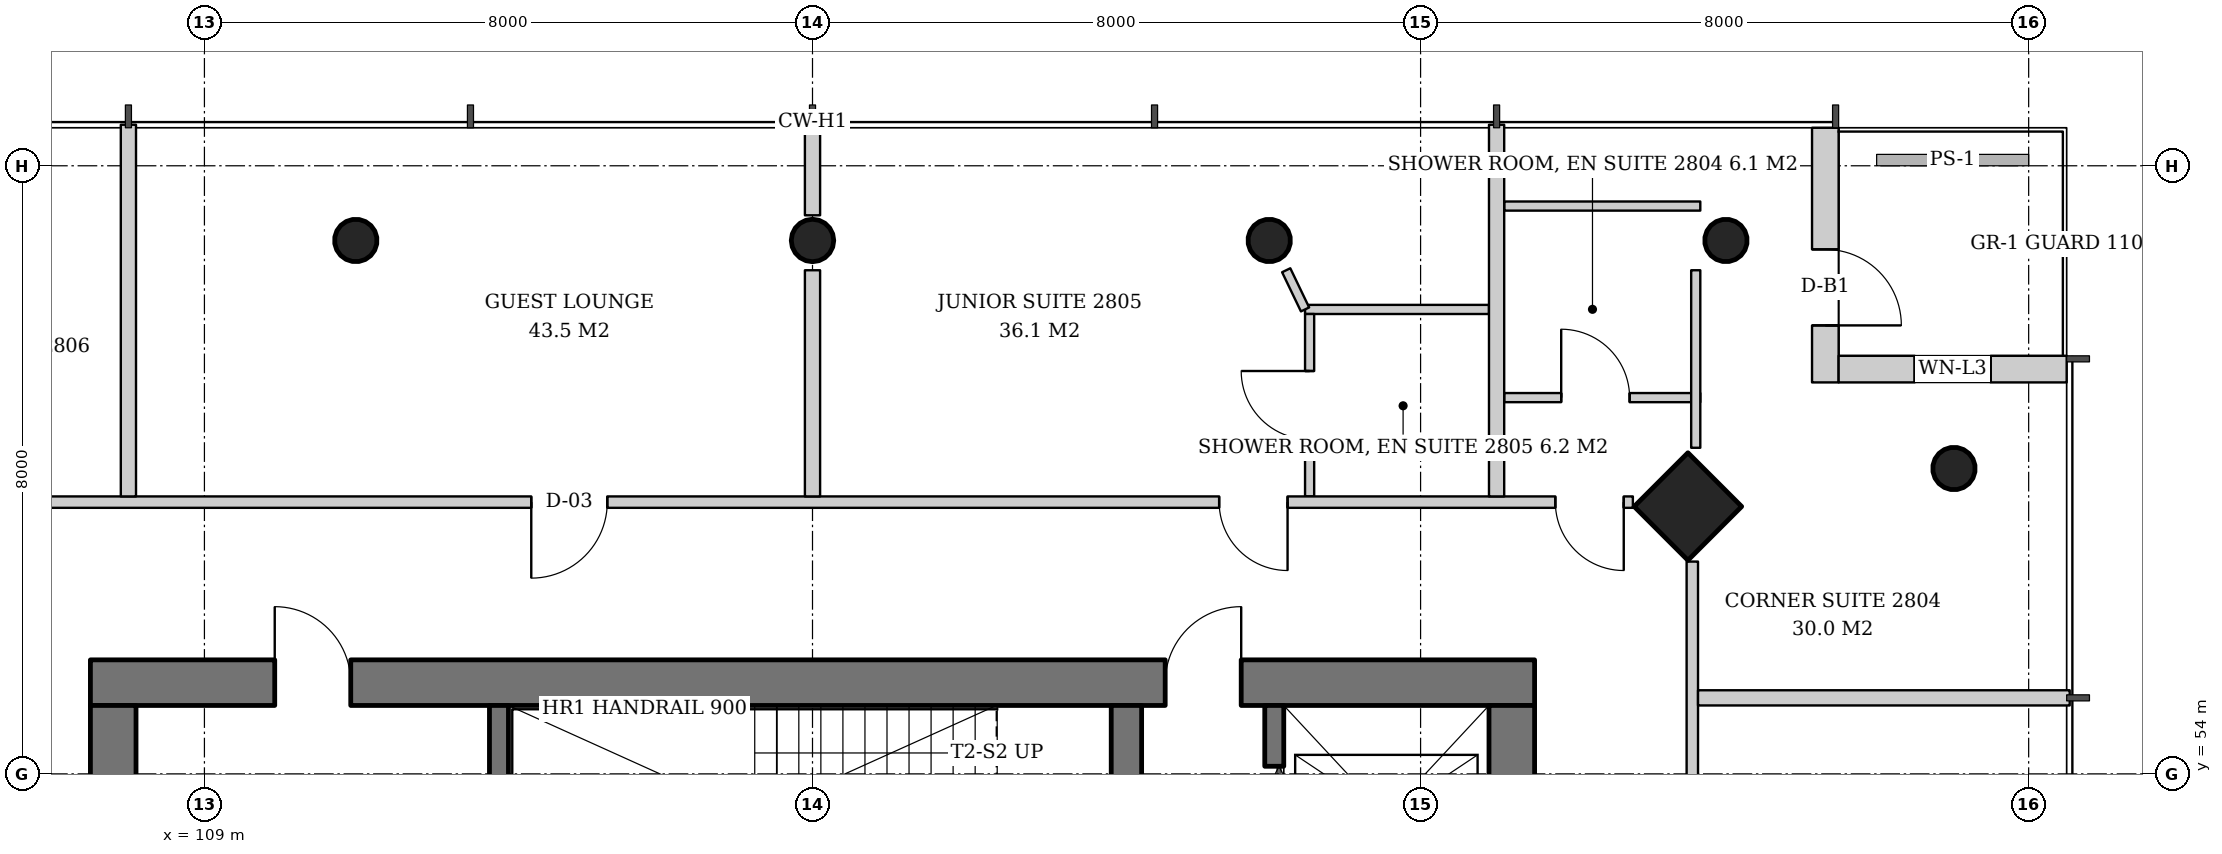
"""IFC4 building model, lengths in metres.
Left out: names, types, materials, properties, quantities, classifications, styles, units other than length and angle.
Written with IfcOpenShell. Run it as: python <this file> out.ifc"""

import sys

from ifc_helpers import new_model, si_unit, direction, frame, frame_2d, origin, origin_2d, place, context, subcontext, project, spatial, rectangle, hollow_circle, extrude, element, fill, save


model = new_model("IFC4")
c1 = context("Model", 3, precision=1e-05, world=origin(), true_north=direction((0.0, 1.0)))
c2 = subcontext(c1, "Body", "Model", "MODEL_VIEW")
j1 = project(units=[si_unit("LENGTHUNIT", "METRE"), si_unit("PLANEANGLEUNIT", "RADIAN")], contexts=[c1])
p1 = place(None, origin())
s1 = spatial("IfcSite", under=j1, at=p1, CompositionType="ELEMENT")
p2 = place(p1, origin())
s2 = spatial("IfcBuilding", under=s1, at=p2, CompositionType="ELEMENT")
p3 = place(p2, frame((0.0, 0.0, 112.2)))
s3 = spatial("IfcBuildingStorey", under=s2, at=p3, CompositionType="ELEMENT", Elevation=112.2)
p4 = place(p3, frame((128.569, 57.569, 0.0), z_axis=(-0.042965756413, -0.042965756413, 0.998152236661), x_axis=(0.707106781187, -0.707106781187, 0.0)))
e1 = element("IfcColumn", 1, at=p4, inside=s3, PredefinedType="COLUMN", context=c2, shape_type="SweptSolid", body=[
    extrude(rectangle(XDim=1.0, YDim=1.0, at=origin_2d()), origin(), (0.0, 0.0, 1.0), 3.807),
])
for number, where, z_axis, x_axis in (
    (2, (132.069, 58.069, 0.0), (-0.043, -0.043, 0.998), (0.707, -0.707, 0.0)),
    (3, (129.069, 61.069, 0.0), (-0.043, -0.043, 0.998), (0.707, -0.707, 0.0)),
):
    element("IfcColumn", number, at=place(p3, frame(where, z_axis=z_axis, x_axis=x_axis)), inside=s3, PredefinedType="COLUMN", context=c2, shape_type="SweptSolid", body=[
        extrude(hollow_circle(Radius=0.28, WallThickness=0.02, at=origin_2d()), origin(), (0.0, 0.0, 1.0), 3.807),
    ])
p5 = place(p3, frame((123.034, 61.069, 0.0), z_axis=(-0.021497765643, -0.042995531285, 0.998843946952), x_axis=(0.894427191, -0.4472135955, 0.0)))
e4 = element("IfcColumn", 4, at=p5, inside=s3, PredefinedType="COLUMN", context=c2, shape_type="SweptSolid", body=[
    extrude(hollow_circle(Radius=0.28, WallThickness=0.02, at=origin_2d()), origin(), (0.0, 0.0, 1.0), 3.804),
])
p6 = place(p3, frame((117.0, 61.069, 0.0), z_axis=(0.0, -0.043005470007, 0.999074836811), x_axis=(1.0, 0.0, 0.0)))
e5 = element("IfcColumn", 5, at=p6, inside=s3, PredefinedType="COLUMN", context=c2, shape_type="SweptSolid", body=[
    extrude(hollow_circle(Radius=0.28, WallThickness=0.02, at=origin_2d()), origin(), (0.0, 0.0, 1.0), 3.803),
])
p7 = place(p3, frame((110.966, 61.069, 0.0), z_axis=(0.021497765643, -0.042995531285, 0.998843946952), x_axis=(0.894427191, 0.4472135955, 0.0)))
e6 = element("IfcColumn", 6, at=p7, inside=s3, PredefinedType="COLUMN", context=c2, shape_type="SweptSolid", body=[
    extrude(hollow_circle(Radius=0.28, WallThickness=0.02, at=origin_2d()), origin(), (0.0, 0.0, 1.0), 3.804),
])
p8 = place(p3, frame((107.5, 55.2, 0.0), z_axis=(0.0, 0.0, 1.0), x_axis=(1.0, 0.0, 0.0)))
e7 = element("IfcWall", 7, at=p8, inside=s3, PredefinedType="SHEAR", context=c2, shape_type="SweptSolid", body=[
    extrude(rectangle(XDim=19.0, YDim=0.6, at=frame_2d((9.5, 0.0))), origin(), (0.0, 0.0, 1.0), 3.8),
])
p9 = place(p8, frame((14.14, 0.0, 0.0)))
e8 = element("IfcOpeningElement", 8, at=p9, cuts=e7, PredefinedType="OPENING", context=c2, shape_type="SweptSolid", body=[
    extrude(rectangle(XDim=1.0, YDim=2.1, at=frame_2d((0.5, 1.05))), frame((0.0, 0.31, 0.0), z_axis=(0.0, -1.0, 0.0), x_axis=(1.0, 0.0, 0.0)), (0.0, 0.0, 1.0), 0.62),
])
p10 = place(p8, frame((2.425, 0.0, 0.0)))
e9 = element("IfcOpeningElement", 9, at=p10, cuts=e7, PredefinedType="OPENING", context=c2, shape_type="SweptSolid", body=[
    extrude(rectangle(XDim=1.0, YDim=2.1, at=frame_2d((0.5, 1.05))), frame((0.0, 0.31, 0.0), z_axis=(0.0, -1.0, 0.0), x_axis=(1.0, 0.0, 0.0)), (0.0, 0.0, 1.0), 0.62),
])
p11 = place(p3, frame((107.8, 37.1, 0.0), z_axis=(0.0, 0.0, 1.0), x_axis=(0.0, 1.0, 0.0)))
e10 = element("IfcWall", 10, at=p11, inside=s3, PredefinedType="SHEAR", context=c2, shape_type="SweptSolid", body=[
    extrude(rectangle(XDim=17.8, YDim=0.6, at=frame_2d((8.9, 0.0))), origin(), (0.0, 0.0, 1.0), 3.8),
])
p12 = place(p11, frame((8.0, 0.0, 0.0)))
e11 = element("IfcOpeningElement", 11, at=p12, cuts=e10, PredefinedType="OPENING", context=c2, shape_type="SweptSolid", body=[
    extrude(rectangle(XDim=1.8, YDim=2.4, at=frame_2d((0.9, 1.2))), frame((0.0, 0.31, 0.0), z_axis=(0.0, -1.0, 0.0), x_axis=(1.0, 0.0, 0.0)), (0.0, 0.0, 1.0), 0.62),
])
p13 = place(p3, frame((126.2, 37.1, 0.0), z_axis=(0.0, 0.0, 1.0), x_axis=(0.0, 1.0, 0.0)))
e12 = element("IfcWall", 12, at=p13, inside=s3, PredefinedType="SHEAR", context=c2, shape_type="SweptSolid", body=[
    extrude(rectangle(XDim=17.8, YDim=0.6, at=frame_2d((8.9, 0.0))), origin(), (0.0, 0.0, 1.0), 3.8),
])
p14 = place(p13, frame((8.0, 0.0, 0.0)))
e13 = element("IfcOpeningElement", 13, at=p14, cuts=e12, PredefinedType="OPENING", context=c2, shape_type="SweptSolid", body=[
    extrude(rectangle(XDim=1.8, YDim=2.4, at=frame_2d((0.9, 1.2))), frame((0.0, 0.31, 0.0), z_axis=(0.0, -1.0, 0.0), x_axis=(1.0, 0.0, 0.0)), (0.0, 0.0, 1.0), 0.62),
])
p15 = place(p3, frame((121.13, 52.0, 0.0), z_axis=(0.0, 0.0, 1.0), x_axis=(0.0, 1.0, 0.0)))
e14 = element("IfcWall", 14, at=p15, inside=s3, PredefinedType="SHEAR", context=c2, shape_type="SweptSolid", body=[
    extrude(rectangle(XDim=2.9, YDim=0.4, at=frame_2d((1.45, 0.0))), origin(), (0.0, 0.0, 1.0), 3.8),
])
p16 = place(p15, frame((0.3, 0.0, 0.0)))
e15 = element("IfcOpeningElement", 15, at=p16, cuts=e14, PredefinedType="OPENING", context=c2, shape_type="SweptSolid", body=[
    extrude(rectangle(XDim=1.0, YDim=2.1, at=frame_2d((0.5, 1.05))), frame((0.0, 0.21, 0.0), z_axis=(0.0, -1.0, 0.0), x_axis=(1.0, 0.0, 0.0)), (0.0, 0.0, 1.0), 0.42),
])
p17 = place(p3, frame((130.325, 62.5, 0.0), z_axis=(0.0, 0.0, 1.0), x_axis=(0.0, -1.0, 0.0)))
e16 = element("IfcWall", 16, at=p17, inside=s3, PredefinedType="SOLIDWALL", context=c2, shape_type="SweptSolid", body=[
    extrude(rectangle(XDim=3.35, YDim=0.35, at=frame_2d((1.675, 0.0))), origin(), (0.0, 0.0, 1.0), 3.6),
])
p18 = place(p17, frame((1.6, 0.0, 0.0)))
e17 = element("IfcOpeningElement", 17, at=p18, cuts=e16, PredefinedType="OPENING", context=c2, shape_type="SweptSolid", body=[
    extrude(rectangle(XDim=1.0, YDim=2.4, at=frame_2d((0.5, 1.2))), frame((0.0, 0.185, 0.0), z_axis=(0.0, -1.0, 0.0), x_axis=(1.0, 0.0, 0.0)), (0.0, 0.0, 1.0), 0.37),
])
p19 = place(p3, frame((130.5, 59.325, 0.0), z_axis=(0.0, 0.0, 1.0), x_axis=(1.0, 0.0, 0.0)))
e18 = element("IfcWall", 18, at=p19, inside=s3, PredefinedType="SOLIDWALL", context=c2, shape_type="SweptSolid", body=[
    extrude(rectangle(XDim=3.0, YDim=0.35, at=frame_2d((1.5, 0.0))), origin(), (0.0, 0.0, 1.0), 3.6),
])
p20 = place(p19, frame((1.0, 0.0, 0.9)))
e19 = element("IfcOpeningElement", 19, at=p20, cuts=e18, PredefinedType="OPENING", context=c2, shape_type="SweptSolid", body=[
    extrude(rectangle(XDim=1.0, YDim=2.4, at=frame_2d((0.5, 1.2))), frame((0.0, 0.185, 0.0), z_axis=(0.0, -1.0, 0.0), x_axis=(1.0, 0.0, 0.0)), (0.0, 0.0, 1.0), 0.37),
])
p21 = place(p3, frame((112.875, 52.0, 0.0), z_axis=(0.0, 0.0, 1.0), x_axis=(0.0, 1.0, 0.0)))
e20 = element("IfcWall", 20, at=p21, inside=s3, PredefinedType="SHEAR", context=c2, shape_type="SweptSolid", body=[
    extrude(rectangle(XDim=2.9, YDim=0.25, at=frame_2d((1.45, 0.0))), origin(), (0.0, 0.0, 1.0), 3.8),
])
p22 = place(p3, frame((123.075, 52.0, 0.0), z_axis=(0.0, 0.0, 1.0), x_axis=(0.0, 1.0, 0.0)))
e21 = element("IfcWall", 21, at=p22, inside=s3, PredefinedType="SHEAR", context=c2, shape_type="SweptSolid", body=[
    extrude(rectangle(XDim=2.9, YDim=0.25, at=frame_2d((1.45, 0.0))), origin(), (0.0, 0.0, 1.0), 3.8),
])
p23 = place(p22, frame((0.8, 0.0, 0.0)))
e22 = element("IfcOpeningElement", 22, at=p23, cuts=e21, PredefinedType="OPENING", context=c2, shape_type="SweptSolid", body=[
    extrude(rectangle(XDim=1.3, YDim=2.2, at=frame_2d((0.65, 1.1))), frame((0.0, 0.135, 0.0), z_axis=(0.0, -1.0, 0.0), x_axis=(1.0, 0.0, 0.0)), (0.0, 0.0, 1.0), 0.27),
])
p24 = place(p3, frame((128.575, 35.207, 0.0), z_axis=(0.0, 0.0, 1.0), x_axis=(0.0, 1.0, 0.0)))
e23 = element("IfcWall", 23, at=p24, inside=s3, PredefinedType="PARTITIONING", context=c2, shape_type="SweptSolid", body=[
    extrude(rectangle(XDim=21.586, YDim=0.15, at=frame_2d((10.793, 0.0))), origin(), (0.0, 0.0, 1.0), 2.9),
])
p25 = place(p24, frame((0.12, 0.0, 0.0)))
e24 = element("IfcOpeningElement", 24, at=p25, cuts=e23, PredefinedType="OPENING", context=c2, shape_type="SweptSolid", body=[
    extrude(rectangle(XDim=0.9, YDim=2.1, at=frame_2d((0.45, 1.05))), frame((0.0, 0.085, 0.0), z_axis=(0.0, -1.0, 0.0), x_axis=(1.0, 0.0, 0.0)), (0.0, 0.0, 1.0), 0.17),
])
p26 = place(p24, frame((4.543, 0.0, 0.0)))
e25 = element("IfcOpeningElement", 25, at=p26, cuts=e23, PredefinedType="OPENING", context=c2, shape_type="SweptSolid", body=[
    extrude(rectangle(XDim=0.9, YDim=2.1, at=frame_2d((0.45, 1.05))), frame((0.0, 0.085, 0.0), z_axis=(0.0, -1.0, 0.0), x_axis=(1.0, 0.0, 0.0)), (0.0, 0.0, 1.0), 0.17),
])
p27 = place(p24, frame((13.543, 0.0, 0.0)))
e26 = element("IfcOpeningElement", 26, at=p27, cuts=e23, PredefinedType="OPENING", context=c2, shape_type="SweptSolid", body=[
    extrude(rectangle(XDim=0.9, YDim=2.1, at=frame_2d((0.45, 1.05))), frame((0.0, 0.085, 0.0), z_axis=(0.0, -1.0, 0.0), x_axis=(1.0, 0.0, 0.0)), (0.0, 0.0, 1.0), 0.17),
])
p28 = place(p3, frame((128.65, 55.0, 0.0), z_axis=(0.0, 0.0, 1.0), x_axis=(1.0, 0.0, 0.0)))
e27 = element("IfcWall", 27, at=p28, inside=s3, PredefinedType="PARTITIONING", context=c2, shape_type="SweptSolid", body=[
    extrude(rectangle(XDim=4.89, YDim=0.2, at=frame_2d((2.445, 0.0))), origin(), (0.0, 0.0, 1.0), 3.2),
])
p29 = place(p3, frame((126.1, 58.95, 0.0), z_axis=(0.0, 0.0, 1.0), x_axis=(1.0, 0.0, 0.0)))
e28 = element("IfcWall", 28, at=p29, inside=s3, PredefinedType="PARTITIONING", context=c2, shape_type="SweptSolid", body=[
    extrude(rectangle(XDim=2.58, YDim=0.12, at=frame_2d((1.29, 0.0))), origin(), (0.0, 0.0, 1.0), 2.9),
])
p30 = place(p29, frame((0.75, 0.0, 0.0)))
e29 = element("IfcOpeningElement", 29, at=p30, cuts=e28, PredefinedType="OPENING", context=c2, shape_type="SweptSolid", body=[
    extrude(rectangle(XDim=0.9, YDim=2.1, at=frame_2d((0.45, 1.05))), frame((0.0, 0.07, 0.0), z_axis=(0.0, -1.0, 0.0), x_axis=(1.0, 0.0, 0.0)), (0.0, 0.0, 1.0), 0.14),
])
p31 = place(p3, frame((126.1, 61.47, 0.0), z_axis=(0.0, 0.0, 1.0), x_axis=(1.0, 0.0, 0.0)))
e30 = element("IfcWall", 30, at=p31, inside=s3, PredefinedType="PARTITIONING", context=c2, shape_type="SweptSolid", body=[
    extrude(rectangle(XDim=2.58, YDim=0.12, at=frame_2d((1.29, 0.0))), origin(), (0.0, 0.0, 1.0), 3.6),
])
p32 = place(p3, frame((128.62, 58.29, 0.0), z_axis=(0.0, 0.0, 1.0), x_axis=(0.0, 1.0, 0.0)))
e31 = element("IfcWall", 31, at=p32, inside=s3, PredefinedType="PARTITIONING", context=c2, shape_type="SweptSolid", body=[
    extrude(rectangle(XDim=2.336, YDim=0.12, at=frame_2d((1.168, 0.0))), origin(), (0.0, 0.0, 1.0), 3.2),
])
p33 = place(p3, frame((125.9, 60.11, 0.0), z_axis=(0.0, 0.0, 1.0), x_axis=(-1.0, 0.0, 0.0)))
e32 = element("IfcWall", 32, at=p33, inside=s3, PredefinedType="PARTITIONING", context=c2, shape_type="SweptSolid", body=[
    extrude(rectangle(XDim=2.42, YDim=0.12, at=frame_2d((1.21, 0.0))), origin(), (0.0, 0.0, 1.0), 3.6),
])
p34 = place(p3, frame((123.54, 57.65, 0.0), z_axis=(0.0, 0.0, 1.0), x_axis=(0.0, 1.0, 0.0)))
e33 = element("IfcWall", 33, at=p34, inside=s3, PredefinedType="PARTITIONING", context=c2, shape_type="SweptSolid", body=[
    extrude(rectangle(XDim=2.4, YDim=0.12, at=frame_2d((1.2, 0.0))), origin(), (0.0, 0.0, 1.0), 3.6),
])
p35 = place(p34, frame((0.75, 0.0, 0.0)))
e34 = element("IfcOpeningElement", 34, at=p35, cuts=e33, PredefinedType="OPENING", context=c2, shape_type="SweptSolid", body=[
    extrude(rectangle(XDim=0.9, YDim=2.1, at=frame_2d((0.45, 1.05))), frame((0.0, 0.07, 0.0), z_axis=(0.0, -1.0, 0.0), x_axis=(1.0, 0.0, 0.0)), (0.0, 0.0, 1.0), 0.14),
])
p36 = place(p3, frame((127.793, 57.575, 0.0), z_axis=(0.0, 0.0, 1.0), x_axis=(-1.0, 0.0, 0.0)))
e35 = element("IfcWall", 35, at=p36, inside=s3, PredefinedType="PARTITIONING", context=c2, shape_type="SweptSolid", body=[
    extrude(rectangle(XDim=21.586, YDim=0.15, at=frame_2d((10.793, 0.0))), origin(), (0.0, 0.0, 1.0), 2.9),
])
p37 = place(p36, frame((0.12, 0.0, 0.0)))
e36 = element("IfcOpeningElement", 36, at=p37, cuts=e35, PredefinedType="OPENING", context=c2, shape_type="SweptSolid", body=[
    extrude(rectangle(XDim=0.9, YDim=2.1, at=frame_2d((0.45, 1.05))), frame((0.0, 0.085, 0.0), z_axis=(0.0, -1.0, 0.0), x_axis=(1.0, 0.0, 0.0)), (0.0, 0.0, 1.0), 0.17),
])
p38 = place(p36, frame((4.543, 0.0, 0.0)))
e37 = element("IfcOpeningElement", 37, at=p38, cuts=e35, PredefinedType="OPENING", context=c2, shape_type="SweptSolid", body=[
    extrude(rectangle(XDim=0.9, YDim=2.1, at=frame_2d((0.45, 1.05))), frame((0.0, 0.085, 0.0), z_axis=(0.0, -1.0, 0.0), x_axis=(1.0, 0.0, 0.0)), (0.0, 0.0, 1.0), 0.17),
])
p39 = place(p36, frame((13.493, 0.0, 0.0)))
e38 = element("IfcOpeningElement", 38, at=p39, cuts=e35, PredefinedType="OPENING", context=c2, shape_type="SweptSolid", body=[
    extrude(rectangle(XDim=1.0, YDim=2.1, at=frame_2d((0.5, 1.05))), frame((0.0, 0.085, 0.0), z_axis=(0.0, -1.0, 0.0), x_axis=(1.0, 0.0, 0.0)), (0.0, 0.0, 1.0), 0.17),
])
p40 = place(p3, frame((126.0, 57.65, 0.0), z_axis=(0.0, 0.0, 1.0), x_axis=(0.0, 1.0, 0.0)))
e39 = element("IfcWall", 39, at=p40, inside=s3, PredefinedType="PARTITIONING", context=c2, shape_type="SweptSolid", body=[
    extrude(rectangle(XDim=4.89, YDim=0.2, at=frame_2d((2.445, 0.0))), origin(), (0.0, 0.0, 1.0), 2.9),
])
p41 = place(p3, frame((117.0, 57.65, 0.0), z_axis=(0.0, 0.0, 1.0), x_axis=(0.0, 1.0, 0.0)))
e40 = element("IfcWall", 40, at=p41, inside=s3, PredefinedType="PARTITIONING", context=c2, shape_type="SweptSolid", body=[
    extrude(rectangle(XDim=2.976, YDim=0.2, at=frame_2d((1.488, 0.0))), origin(), (0.0, 0.0, 1.0), 3.6),
])
p42 = place(p3, frame((117.0, 61.348, 0.0), z_axis=(0.0, 0.0, 1.0), x_axis=(0.0, 1.0, 0.0)))
e41 = element("IfcWall", 41, at=p42, inside=s3, PredefinedType="PARTITIONING", context=c2, shape_type="SweptSolid", body=[
    extrude(rectangle(XDim=1.192, YDim=0.2, at=frame_2d((0.596, 0.0))), origin(), (0.0, 0.0, 1.0), 3.6),
])
p43 = place(p3, frame((108.0, 57.65, 0.0), z_axis=(0.0, 0.0, 1.0), x_axis=(0.0, 1.0, 0.0)))
e42 = element("IfcWall", 42, at=p43, inside=s3, PredefinedType="PARTITIONING", context=c2, shape_type="SweptSolid", body=[
    extrude(rectangle(XDim=4.89, YDim=0.2, at=frame_2d((2.445, 0.0))), origin(), (0.0, 0.0, 1.0), 3.2),
])
p44 = place(p3, frame((123.48, 60.11, 0.0), z_axis=(0.0, 0.0, 1.0), x_axis=(-0.433161107778, 0.901316511947, 0.0)))
e43 = element("IfcWall", 43, at=p44, inside=s3, PredefinedType="PARTITIONING", context=c2, shape_type="SweptSolid", body=[
    extrude(rectangle(XDim=0.572, YDim=0.12, at=frame_2d((0.286, 0.0))), origin(), (0.0, 0.0, 1.0), 3.6),
])
p45 = place(p18, origin())
e44 = element("IfcDoor", 44, at=p45, inside=s3, OperationType="SINGLE_SWING_RIGHT", PredefinedType="DOOR", context=c2, shape_type="SweptSolid", body=[
    extrude(rectangle(XDim=1.0, YDim=2.4, at=frame_2d((0.5, 1.2))), frame((0.0, 0.025, 0.0), z_axis=(0.0, -1.0, 0.0), x_axis=(1.0, 0.0, 0.0)), (0.0, 0.0, 1.0), 0.05),
])
fill(e17, e44)
p46 = place(p20, origin())
e45 = element("IfcWindow", 45, at=p46, inside=s3, PartitioningType="SINGLE_PANEL", PredefinedType="WINDOW", context=c2, shape_type="SweptSolid", body=[
    extrude(rectangle(XDim=1.0, YDim=2.4, at=frame_2d((0.5, 1.2))), frame((0.0, 0.03, 0.0), z_axis=(0.0, -1.0, 0.0), x_axis=(1.0, 0.0, 0.0)), (0.0, 0.0, 1.0), 0.06),
])
fill(e19, e45)
p47 = place(p23, origin())
e46 = element("IfcDoor", 46, at=p47, inside=s3, OperationType="DOUBLE_DOOR_SLIDING", PredefinedType="DOOR", context=c2, shape_type="SweptSolid", body=[
    extrude(rectangle(XDim=1.3, YDim=2.2, at=frame_2d((0.65, 1.1))), frame((0.0, 0.025, 0.0), z_axis=(0.0, -1.0, 0.0), x_axis=(1.0, 0.0, 0.0)), (0.0, 0.0, 1.0), 0.05),
])
fill(e22, e46)
p48 = place(p9, origin())
e47 = element("IfcDoor", 47, at=p48, inside=s3, OperationType="SINGLE_SWING_RIGHT", PredefinedType="DOOR", context=c2, shape_type="SweptSolid", body=[
    extrude(rectangle(XDim=1.0, YDim=2.1, at=frame_2d((0.5, 1.05))), frame((0.0, 0.025, 0.0), z_axis=(0.0, -1.0, 0.0), x_axis=(1.0, 0.0, 0.0)), (0.0, 0.0, 1.0), 0.05),
])
fill(e8, e47)
p49 = place(p10, origin())
e48 = element("IfcDoor", 48, at=p49, inside=s3, OperationType="SINGLE_SWING_LEFT", PredefinedType="DOOR", context=c2, shape_type="SweptSolid", body=[
    extrude(rectangle(XDim=1.0, YDim=2.1, at=frame_2d((0.5, 1.05))), frame((0.0, -0.24, 0.0), z_axis=(0.0, -1.0, 0.0), x_axis=(1.0, 0.0, 0.0)), (0.0, 0.0, 1.0), 0.05),
])
fill(e9, e48)
p50 = place(p30, origin())
e49 = element("IfcDoor", 49, at=p50, inside=s3, OperationType="SINGLE_SWING_LEFT", PredefinedType="DOOR", context=c2, shape_type="SweptSolid", body=[
    extrude(rectangle(XDim=0.9, YDim=2.1, at=frame_2d((0.45, 1.05))), frame((0.0, 0.025, 0.0), z_axis=(0.0, -1.0, 0.0), x_axis=(1.0, 0.0, 0.0)), (0.0, 0.0, 1.0), 0.05),
])
fill(e29, e49)
p51 = place(p35, origin())
e50 = element("IfcDoor", 50, at=p51, inside=s3, OperationType="SINGLE_SWING_RIGHT", PredefinedType="DOOR", context=c2, shape_type="SweptSolid", body=[
    extrude(rectangle(XDim=0.9, YDim=2.1, at=frame_2d((0.45, 1.05))), frame((0.0, 0.025, 0.0), z_axis=(0.0, -1.0, 0.0), x_axis=(1.0, 0.0, 0.0)), (0.0, 0.0, 1.0), 0.05),
])
fill(e34, e50)
p52 = place(p37, origin())
e51 = element("IfcDoor", 51, at=p52, inside=s3, OperationType="SINGLE_SWING_LEFT", PredefinedType="DOOR", context=c2, shape_type="SweptSolid", body=[
    extrude(rectangle(XDim=0.9, YDim=2.1, at=frame_2d((0.45, 1.05))), frame((0.0, 0.025, 0.0), z_axis=(0.0, -1.0, 0.0), x_axis=(1.0, 0.0, 0.0)), (0.0, 0.0, 1.0), 0.05),
])
fill(e36, e51)
p53 = place(p38, origin())
e52 = element("IfcDoor", 52, at=p53, inside=s3, OperationType="SINGLE_SWING_LEFT", PredefinedType="DOOR", context=c2, shape_type="SweptSolid", body=[
    extrude(rectangle(XDim=0.9, YDim=2.1, at=frame_2d((0.45, 1.05))), frame((0.0, 0.025, 0.0), z_axis=(0.0, -1.0, 0.0), x_axis=(1.0, 0.0, 0.0)), (0.0, 0.0, 1.0), 0.05),
])
fill(e37, e52)
p54 = place(p39, origin())
e53 = element("IfcDoor", 53, at=p54, inside=s3, OperationType="SINGLE_SWING_RIGHT", PredefinedType="DOOR", context=c2, shape_type="SweptSolid", body=[
    extrude(rectangle(XDim=1.0, YDim=2.1, at=frame_2d((0.5, 1.05))), frame((0.0, 0.025, 0.0), z_axis=(0.0, -1.0, 0.0), x_axis=(1.0, 0.0, 0.0)), (0.0, 0.0, 1.0), 0.05),
])
fill(e38, e53)
save(model, sys.argv[1])
